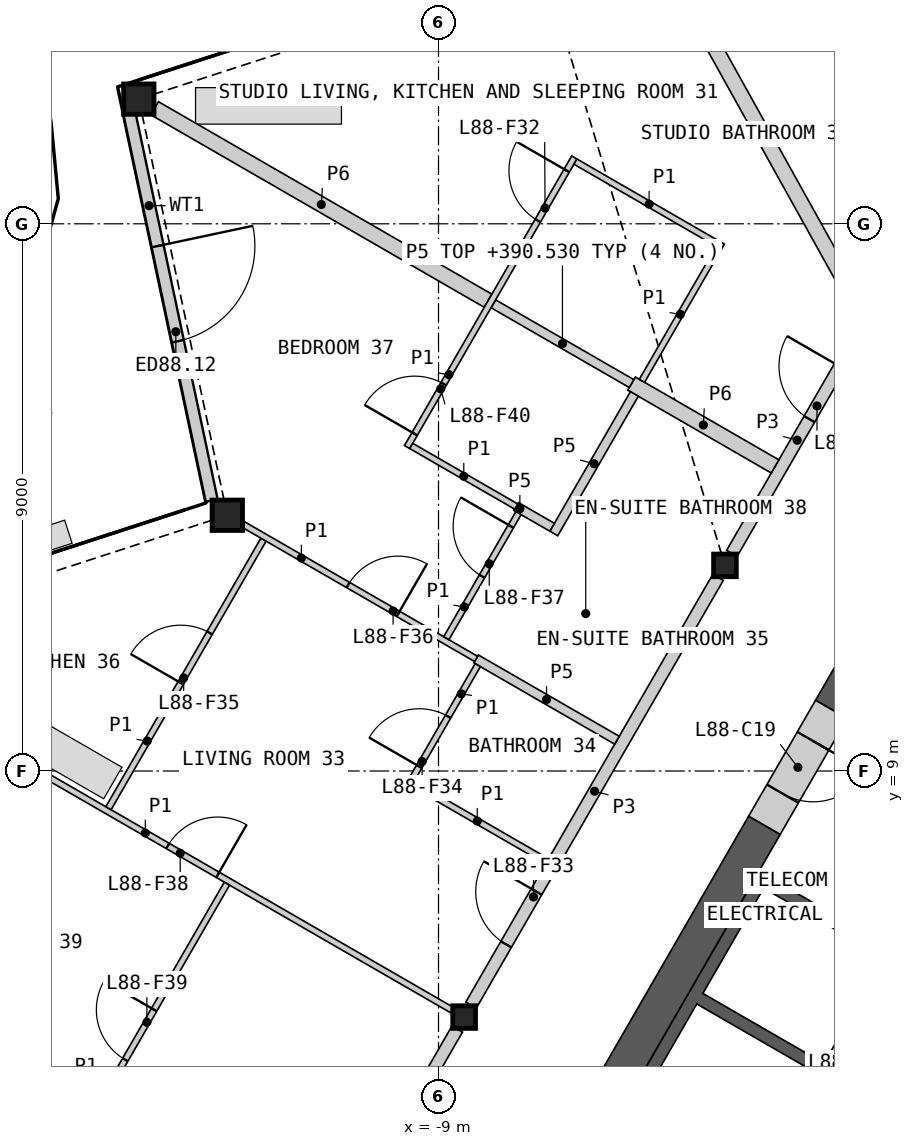
"""IFC4 building model, lengths in metres.
Left out: names, types, materials, properties, quantities, classifications, styles, units other than length and angle.
Written with IfcOpenShell. Run it as: python <this file> out.ifc"""

import sys

from ifc_helpers import new_model, si_unit, direction, frame, frame_2d, origin, origin_2d, place, context, subcontext, project, spatial, polyline, rectangle, hollow_rectangle, i_section, outline, extrude, element, fill, save


model = new_model("IFC4")
c1 = context("Model", 3, precision=1e-05, world=origin(), true_north=direction((0.0, 1.0)))
c2 = subcontext(c1, "Body", "Model", "MODEL_VIEW")
j1 = project(units=[si_unit("LENGTHUNIT", "METRE"), si_unit("PLANEANGLEUNIT", "RADIAN")], contexts=[c1])
p1 = place(None, origin())
s1 = spatial("IfcSite", under=j1, at=p1, CompositionType="ELEMENT")
p2 = place(p1, origin())
s2 = spatial("IfcBuilding", under=s1, at=p2, CompositionType="ELEMENT")
p3 = place(p2, frame((0.0, 0.0, 388.2)))
s3 = spatial("IfcBuildingStorey", under=s2, at=p3, CompositionType="ELEMENT", Elevation=388.2)
for number, where, z_axis, x_axis in (
    (1, (-13.929, 20.051, 0.0), (0.0, 0.0, 1.0), (1.0, 0.0, 0.0)),
    (2, (-12.474, 13.206, 0.0), (0.0, 0.0, 1.0), (1.0, 0.0, 0.0)),
):
    element("IfcColumn", number, at=place(p3, frame(where, z_axis=z_axis, x_axis=x_axis)), inside=s3, PredefinedType="COLUMN", context=c2, shape_type="SweptSolid", body=[
        extrude(hollow_rectangle(XDim=0.5, YDim=0.5, WallThickness=0.03, at=origin_2d()), origin(), (0.0, 0.0, 1.0), 3.4),
    ])
for number, where, z_axis, x_axis in (
    (3, (-4.289, 12.382, 0.0), (0.0, 0.0, 1.0), (1.0, 0.0, 0.0)),
    (4, (-8.578, 4.953, 0.0), (0.0, 0.0, 1.0), (1.0, 0.0, 0.0)),
):
    element("IfcColumn", number, at=place(p3, frame(where, z_axis=z_axis, x_axis=x_axis)), inside=s3, PredefinedType="COLUMN", context=c2, shape_type="SweptSolid", body=[
        extrude(i_section(OverallWidth=0.374, OverallDepth=0.372, WebThickness=0.016, FlangeThickness=0.026, at=origin_2d()), origin(), (0.0, 0.0, 1.0), 3.4),
    ])
p4 = place(p3, frame((-14.104, 19.915, 0.0), z_axis=(0.0, 0.0, 1.0), x_axis=(0.207924998532, -0.978144771997, 0.0)))
e5 = element("IfcWall", 5, at=p4, inside=s3, PredefinedType="SOLIDWALL", context=c2, shape_type="SweptSolid", body=[
    extrude(rectangle(XDim=6.612, YDim=0.2, at=frame_2d((3.306, 0.0))), origin(), (0.0, 0.0, 1.0), 2.634),
])
p5 = place(p4, frame((2.333, 0.0, 0.0)))
e6 = element("IfcOpeningElement", 6, at=p5, cuts=e5, PredefinedType="OPENING", context=c2, shape_type="SweptSolid", body=[
    extrude(rectangle(XDim=1.6, YDim=2.25, at=frame_2d((0.8, 1.125))), frame((0.0, 0.11, 0.0), z_axis=(0.0, -1.0, 0.0), x_axis=(1.0, 0.0, 0.0)), (0.0, 0.0, 1.0), 0.22),
])
p6 = place(p3, origin())
e7 = element("IfcWall", 7, at=p6, inside=s3, PredefinedType="SHEAR", context=c2, shape_type="SweptSolid", body=[
    extrude(outline(polyline([(-4.96, 0.208), (-7.131, 1.461), (-3.731, 7.35), (-1.561, 6.097), (-1.66, 5.924), (-3.652, 7.074), (-4.652, 5.342), (-2.66, 4.192), (-2.76, 4.019), (-4.752, 5.169), (-6.852, 1.531), (-4.861, 0.381), (-4.96, 0.208)])), origin(), (0.0, 0.0, 1.0), 3.1),
])
p7 = place(p3, frame((-1.631, 5.776, 0.0), z_axis=(0.0, 0.0, 1.0), x_axis=(-0.499992876559, -0.866029516466, 0.0)))
e8 = element("IfcWall", 8, at=p7, inside=s3, PredefinedType="SOLIDWALL", context=c2, shape_type="SweptSolid", body=[
    extrude(rectangle(XDim=6.486, YDim=0.2, at=frame_2d((3.243, 0.0))), origin(), (0.0, 0.0, 1.0), 3.1),
])
p8 = place(p7, frame((0.437, 0.0, 0.0)))
e9 = element("IfcOpeningElement", 9, at=p8, cuts=e8, PredefinedType="OPENING", context=c2, shape_type="SweptSolid", body=[
    extrude(rectangle(XDim=0.9, YDim=2.1, at=frame_2d((0.45, 1.05))), frame((0.0, 0.11, 0.0), z_axis=(0.0, -1.0, 0.0), x_axis=(1.0, 0.0, 0.0)), (0.0, 0.0, 1.0), 0.22),
])
p9 = place(p7, frame((3.737, 0.0, 0.0)))
e10 = element("IfcOpeningElement", 10, at=p9, cuts=e8, PredefinedType="OPENING", context=c2, shape_type="SweptSolid", body=[
    extrude(rectangle(XDim=0.9, YDim=2.1, at=frame_2d((0.45, 1.05))), frame((0.0, 0.11, 0.0), z_axis=(0.0, -1.0, 0.0), x_axis=(1.0, 0.0, 0.0)), (0.0, 0.0, 1.0), 0.22),
])
p10 = place(p3, frame((-3.639, 8.107, 0.0), z_axis=(0.0, 0.0, 1.0), x_axis=(-0.49999180351, -0.866030135978, 0.0)))
e11 = element("IfcWall", 11, at=p10, inside=s3, PredefinedType="SHEAR", context=c2, shape_type="SweptSolid", body=[
    extrude(rectangle(XDim=7.401, YDim=0.6, at=frame_2d((3.701, 0.0))), origin(), (0.0, 0.0, 1.0), 3.1),
])
p11 = place(p3, frame((-0.26, 13.961, 0.0), z_axis=(0.0, 0.0, 1.0), x_axis=(-0.499980485389, -0.866036670257, 0.0)))
e12 = element("IfcWall", 12, at=p11, inside=s3, PredefinedType="SHEAR", context=c2, shape_type="SweptSolid", body=[
    extrude(rectangle(XDim=4.559, YDim=0.6, at=frame_2d((2.28, 0.0))), origin(), (0.0, 0.0, 1.0), 3.1),
])
p12 = place(p3, frame((-2.539, 10.013, 0.0), z_axis=(0.0, 0.0, 1.0), x_axis=(-0.50002983664, -0.866008176907, 0.0)))
e13 = element("IfcWall", 13, at=p12, inside=s3, PredefinedType="SHEAR", context=c2, shape_type="SweptSolid", body=[
    extrude(rectangle(XDim=2.2, YDim=0.6, at=frame_2d((1.1, 0.0))), origin(), (0.0, 0.0, 1.0), 3.1),
])
p13 = place(p12, frame((0.6, 0.0, 0.0)))
e14 = element("IfcOpeningElement", 14, at=p13, cuts=e13, PredefinedType="OPENING", context=c2, shape_type="SweptSolid", body=[
    extrude(rectangle(XDim=1.0, YDim=2.1, at=frame_2d((0.5, 1.05))), frame((0.0, 0.31, 0.0), z_axis=(0.0, -1.0, 0.0), x_axis=(1.0, 0.0, 0.0)), (0.0, 0.0, 1.0), 0.62),
])
p14 = place(p3, frame((-8.685, 28.499, 0.0), z_axis=(0.0, 0.0, 1.0), x_axis=(0.486017177904, -0.873949256412, 0.0)))
e15 = element("IfcWall", 15, at=p14, inside=s3, PredefinedType="PARTITIONING", context=c2, shape_type="SweptSolid", body=[
    extrude(rectangle(XDim=13.956, YDim=0.25, at=frame_2d((6.978, 0.0))), origin(), (0.0, 0.0, 1.0), 2.33),
])
p15 = place(p3, frame((-8.465, 5.15, 0.0), z_axis=(0.0, 0.0, 1.0), x_axis=(0.499992155518, 0.866029932751, 0.0)))
e16 = element("IfcWall", 16, at=p15, inside=s3, PredefinedType="PARTITIONING", context=c2, shape_type="SweptSolid", body=[
    extrude(rectangle(XDim=8.123, YDim=0.2, at=frame_2d((4.062, 0.0))), origin(), (0.0, 0.0, 1.0), 3.1),
])
p16 = place(p15, frame((1.153, 0.0, 0.0)))
e17 = element("IfcOpeningElement", 17, at=p16, cuts=e16, PredefinedType="OPENING", context=c2, shape_type="SweptSolid", body=[
    extrude(rectangle(XDim=1.0, YDim=2.1, at=frame_2d((0.5, 1.05))), frame((0.0, 0.11, 0.0), z_axis=(0.0, -1.0, 0.0), x_axis=(1.0, 0.0, 0.0)), (0.0, 0.0, 1.0), 0.22),
])
p17 = place(p3, frame((-12.754, -2.279, 0.0), z_axis=(0.0, 0.0, 1.0), x_axis=(0.500001682468, 0.866024432409, 0.0)))
e18 = element("IfcWall", 18, at=p17, inside=s3, PredefinedType="PARTITIONING", context=c2, shape_type="SweptSolid", body=[
    extrude(rectangle(XDim=8.124, YDim=0.2, at=frame_2d((4.062, 0.0))), origin(), (0.0, 0.0, 1.0), 3.1),
])
p18 = place(p17, frame((1.153, 0.0, 0.0)))
e19 = element("IfcOpeningElement", 19, at=p18, cuts=e18, PredefinedType="OPENING", context=c2, shape_type="SweptSolid", body=[
    extrude(rectangle(XDim=1.0, YDim=2.1, at=frame_2d((0.5, 1.05))), frame((0.0, 0.11, 0.0), z_axis=(0.0, -1.0, 0.0), x_axis=(1.0, 0.0, 0.0)), (0.0, 0.0, 1.0), 0.22),
])
p19 = place(p3, frame((-17.414, 4.049, 0.0), z_axis=(0.0, 0.0, 1.0), x_axis=(0.866033839264, -0.499985389037, 0.0)))
e20 = element("IfcWall", 20, at=p19, inside=s3, PredefinedType="PARTITIONING", context=c2, shape_type="SweptSolid", body=[
    extrude(rectangle(XDim=7.1, YDim=0.25, at=frame_2d((3.55, 0.0))), origin(), (0.0, 0.0, 1.0), 2.33),
])
p20 = place(p3, frame((-13.669, 19.9, 0.0), z_axis=(0.0, 0.0, 1.0), x_axis=(0.866032778651, -0.499987226139, 0.0)))
e21 = element("IfcWall", 21, at=p20, inside=s3, PredefinedType="PARTITIONING", context=c2, shape_type="SweptSolid", body=[
    extrude(rectangle(XDim=6.332, YDim=0.25, at=frame_2d((3.166, 0.0))), origin(), (0.0, 0.0, 1.0), 2.33),
])
p21 = place(p3, frame((-4.176, 12.579, 0.0), z_axis=(0.0, 0.0, 1.0), x_axis=(0.500004215162, 0.866022970146, 0.0)))
e22 = element("IfcWall", 22, at=p21, inside=s3, PredefinedType="PARTITIONING", context=c2, shape_type="SweptSolid", body=[
    extrude(rectangle(XDim=4.3, YDim=0.2, at=frame_2d((2.15, 0.0))), origin(), (0.0, 0.0, 1.0), 3.1),
])
p22 = place(p21, frame((2.55, 0.0, 0.0)))
e23 = element("IfcOpeningElement", 23, at=p22, cuts=e22, PredefinedType="OPENING", context=c2, shape_type="SweptSolid", body=[
    extrude(rectangle(XDim=1.0, YDim=2.1, at=frame_2d((0.5, 1.05))), frame((0.0, 0.11, 0.0), z_axis=(0.0, -1.0, 0.0), x_axis=(1.0, 0.0, 0.0)), (0.0, 0.0, 1.0), 0.22),
])
p23 = place(p3, frame((-5.825, 15.372, 0.0), z_axis=(0.0, 0.0, 1.0), x_axis=(0.866051307416, -0.49995513091, 0.0)))
e24 = element("IfcWall", 24, at=p23, inside=s3, PredefinedType="PARTITIONING", context=c2, shape_type="SweptSolid", body=[
    extrude(rectangle(XDim=2.725, YDim=0.25, at=frame_2d((1.362, 0.0))), origin(), (0.0, 0.0, 1.0), 2.33),
])
p24 = place(p3, frame((-8.098, 16.684, 0.0), z_axis=(0.0, 0.0, 1.0), x_axis=(0.866036909293, -0.499980071345, 0.0)))
e25 = element("IfcWall", 25, at=p24, inside=s3, PredefinedType="PLUMBINGWALL", context=c2, shape_type="SweptSolid", body=[
    extrude(rectangle(XDim=2.625, YDim=0.15, at=frame_2d((1.312, 0.0))), origin(), (0.0, 0.0, 1.0), 2.33),
])
p25 = place(p3, frame((-8.382, 10.844, 0.0), z_axis=(0.0, 0.0, 1.0), x_axis=(0.866021425885, -0.500006889861, 0.0)))
e26 = element("IfcWall", 26, at=p25, inside=s3, PredefinedType="PLUMBINGWALL", context=c2, shape_type="SweptSolid", body=[
    extrude(rectangle(XDim=2.675, YDim=0.15, at=frame_2d((1.337, 0.0))), origin(), (0.0, 0.0, 1.0), 2.33),
])
p26 = place(p3, frame((-7.104, 12.906, 0.0), z_axis=(0.0, 0.0, 1.0), x_axis=(0.499993606316, 0.866029095148, 0.0)))
e27 = element("IfcWall", 27, at=p26, inside=s3, PredefinedType="PLUMBINGWALL", context=c2, shape_type="SweptSolid", body=[
    extrude(rectangle(XDim=2.65, YDim=0.15, at=frame_2d((1.325, 0.0))), origin(), (0.0, 0.0, 1.0), 2.33),
])
p27 = place(p3, frame((-7.72, 13.349, 0.0), z_axis=(0.0, 0.0, 1.0), x_axis=(0.866113839764, -0.499846793097, 0.0)))
e28 = element("IfcWall", 28, at=p27, inside=s3, PredefinedType="PLUMBINGWALL", context=c2, shape_type="SweptSolid", body=[
    extrude(rectangle(XDim=0.68, YDim=0.15, at=frame_2d((0.34, 0.0))), origin(), (0.0, 0.0, 1.0), 2.33),
])
p28 = place(p3, frame((-18.869, 10.894, 0.0), z_axis=(0.0, 0.0, 1.0), x_axis=(0.866023724155, -0.500002909193, 0.0)))
e29 = element("IfcWall", 29, at=p28, inside=s3, PredefinedType="PARTITIONING", context=c2, shape_type="SweptSolid", body=[
    extrude(rectangle(XDim=11.655, YDim=0.1, at=frame_2d((5.827, 0.0))), origin(), (0.0, 0.0, 1.0), 2.33),
])
p29 = place(p28, frame((6.253, 0.0, 0.0)))
e30 = element("IfcOpeningElement", 30, at=p29, cuts=e29, PredefinedType="OPENING", context=c2, shape_type="SweptSolid", body=[
    extrude(rectangle(XDim=0.95, YDim=2.1, at=frame_2d((0.475, 1.05))), frame((0.0, 0.06, 0.0), z_axis=(0.0, -1.0, 0.0), x_axis=(1.0, 0.0, 0.0)), (0.0, 0.0, 1.0), 0.12),
])
p30 = place(p3, frame((-9.517, 14.328, 0.0), z_axis=(0.0, 0.0, 1.0), x_axis=(0.499996545922, 0.866027397988, 0.0)))
e31 = element("IfcWall", 31, at=p30, inside=s3, PredefinedType="PARTITIONING", context=c2, shape_type="SweptSolid", body=[
    extrude(rectangle(XDim=5.5, YDim=0.1, at=frame_2d((2.75, 0.0))), origin(), (0.0, 0.0, 1.0), 2.33),
])
p31 = place(p30, frame((4.3, 0.0, 0.0)))
e32 = element("IfcOpeningElement", 32, at=p31, cuts=e31, PredefinedType="OPENING", context=c2, shape_type="SweptSolid", body=[
    extrude(rectangle(XDim=0.95, YDim=2.1, at=frame_2d((0.475, 1.05))), frame((0.0, 0.06, 0.0), z_axis=(0.0, -1.0, 0.0), x_axis=(1.0, 0.0, 0.0)), (0.0, 0.0, 1.0), 0.12),
])
p32 = place(p30, frame((0.25, 0.0, 0.0)))
e33 = element("IfcOpeningElement", 33, at=p32, cuts=e31, PredefinedType="OPENING", context=c2, shape_type="SweptSolid", body=[
    extrude(rectangle(XDim=0.95, YDim=2.1, at=frame_2d((0.475, 1.05))), frame((0.0, 0.06, 0.0), z_axis=(0.0, -1.0, 0.0), x_axis=(1.0, 0.0, 0.0)), (0.0, 0.0, 1.0), 0.12),
])
p33 = place(p3, frame((-14.992, 2.796, 0.0), z_axis=(0.0, 0.0, 1.0), x_axis=(0.499990214365, 0.86603105345, 0.0)))
e34 = element("IfcWall", 34, at=p33, inside=s3, PredefinedType="PARTITIONING", context=c2, shape_type="SweptSolid", body=[
    extrude(rectangle(XDim=5.025, YDim=0.1, at=frame_2d((2.512, 0.0))), origin(), (0.0, 0.0, 1.0), 2.33),
])
p34 = place(p33, frame((1.68, 0.0, 0.0)))
e35 = element("IfcOpeningElement", 35, at=p34, cuts=e34, PredefinedType="OPENING", context=c2, shape_type="SweptSolid", body=[
    extrude(rectangle(XDim=0.95, YDim=2.1, at=frame_2d((0.475, 1.05))), frame((0.0, 0.06, 0.0), z_axis=(0.0, -1.0, 0.0), x_axis=(1.0, 0.0, 0.0)), (0.0, 0.0, 1.0), 0.12),
])
p35 = place(p3, frame((-14.428, 8.388, 0.0), z_axis=(0.0, 0.0, 1.0), x_axis=(0.500005610874, 0.86602216432, 0.0)))
e36 = element("IfcWall", 36, at=p35, inside=s3, PredefinedType="PARTITIONING", context=c2, shape_type="SweptSolid", body=[
    extrude(rectangle(XDim=5.1, YDim=0.1, at=frame_2d((2.55, 0.0))), origin(), (0.0, 0.0, 1.0), 2.33),
])
p36 = place(p35, frame((2.379, 0.0, 0.0)))
e37 = element("IfcOpeningElement", 37, at=p36, cuts=e36, PredefinedType="OPENING", context=c2, shape_type="SweptSolid", body=[
    extrude(rectangle(XDim=0.95, YDim=2.1, at=frame_2d((0.475, 1.05))), frame((0.0, 0.06, 0.0), z_axis=(0.0, -1.0, 0.0), x_axis=(1.0, 0.0, 0.0)), (0.0, 0.0, 1.0), 0.12),
])
p37 = place(p3, frame((-12.214, 13.056, 0.0), z_axis=(0.0, 0.0, 1.0), x_axis=(0.866017452598, -0.500013771606, 0.0)))
e38 = element("IfcWall", 38, at=p37, inside=s3, PredefinedType="PARTITIONING", context=c2, shape_type="SweptSolid", body=[
    extrude(rectangle(XDim=4.425, YDim=0.1, at=frame_2d((2.213, 0.0))), origin(), (0.0, 0.0, 1.0), 2.33),
])
p38 = place(p37, frame((1.994, 0.0, 0.0)))
e39 = element("IfcOpeningElement", 39, at=p38, cuts=e38, PredefinedType="OPENING", context=c2, shape_type="SweptSolid", body=[
    extrude(rectangle(XDim=0.95, YDim=2.1, at=frame_2d((0.475, 1.05))), frame((0.0, 0.06, 0.0), z_axis=(0.0, -1.0, 0.0), x_axis=(1.0, 0.0, 0.0)), (0.0, 0.0, 1.0), 0.12),
])
p39 = place(p3, frame((-6.748, 19.023, 0.0), z_axis=(0.0, 0.0, 1.0), x_axis=(0.866034573852, -0.49998411664, 0.0)))
e40 = element("IfcWall", 40, at=p39, inside=s3, PredefinedType="PARTITIONING", context=c2, shape_type="SweptSolid", body=[
    extrude(rectangle(XDim=2.8, YDim=0.1, at=frame_2d((1.4, 0.0))), origin(), (0.0, 0.0, 1.0), 2.33),
])
p40 = place(p3, frame((-5.654, 15.418, 0.0), z_axis=(0.0, 0.0, 1.0), x_axis=(0.500048846702, 0.865997200291, 0.0)))
e41 = element("IfcWall", 41, at=p40, inside=s3, PredefinedType="PARTITIONING", context=c2, shape_type="SweptSolid", body=[
    extrude(rectangle(XDim=2.525, YDim=0.1, at=frame_2d((1.263, 0.0))), origin(), (0.0, 0.0, 1.0), 2.33),
])
p41 = place(p3, frame((-9.51, 8.839, 0.0), z_axis=(0.0, 0.0, 1.0), x_axis=(0.866029095148, -0.499993606316, 0.0)))
e42 = element("IfcWall", 42, at=p41, inside=s3, PredefinedType="PARTITIONING", context=c2, shape_type="SweptSolid", body=[
    extrude(rectangle(XDim=2.65, YDim=0.1, at=frame_2d((1.325, 0.0))), origin(), (0.0, 0.0, 1.0), 2.33),
])
p42 = place(p3, frame((-8.872, 11.184, 0.0), z_axis=(0.0, 0.0, 1.0), x_axis=(0.499986429846, 0.866033238375, 0.0)))
e43 = element("IfcWall", 43, at=p42, inside=s3, PredefinedType="PARTITIONING", context=c2, shape_type="SweptSolid", body=[
    extrude(rectangle(XDim=2.375, YDim=0.1, at=frame_2d((1.188, 0.0))), origin(), (0.0, 0.0, 1.0), 2.33),
])
p43 = place(p42, frame((1.175, 0.0, 0.0)))
e44 = element("IfcOpeningElement", 44, at=p43, cuts=e43, PredefinedType="OPENING", context=c2, shape_type="SweptSolid", body=[
    extrude(rectangle(XDim=0.95, YDim=2.1, at=frame_2d((0.475, 1.05))), frame((0.0, 0.06, 0.0), z_axis=(0.0, -1.0, 0.0), x_axis=(1.0, 0.0, 0.0)), (0.0, 0.0, 1.0), 0.12),
])
p44 = place(p3, frame((-9.442, 8.858, 0.0), z_axis=(0.0, 0.0, 1.0), x_axis=(0.499978335414, 0.866037911478, 0.0)))
e45 = element("IfcWall", 45, at=p44, inside=s3, PredefinedType="PARTITIONING", context=c2, shape_type="SweptSolid", body=[
    extrude(rectangle(XDim=2.175, YDim=0.1, at=frame_2d((1.087, 0.0))), origin(), (0.0, 0.0, 1.0), 2.33),
])
p45 = place(p44, frame((0.25, 0.0, 0.0)))
e46 = element("IfcOpeningElement", 46, at=p45, cuts=e45, PredefinedType="OPENING", context=c2, shape_type="SweptSolid", body=[
    extrude(rectangle(XDim=0.95, YDim=2.1, at=frame_2d((0.475, 1.05))), frame((0.0, 0.06, 0.0), z_axis=(0.0, -1.0, 0.0), x_axis=(1.0, 0.0, 0.0)), (0.0, 0.0, 1.0), 0.12),
])
p46 = place(p3, frame((-9.448, 14.346, 0.0), z_axis=(0.0, 0.0, 1.0), x_axis=(0.866020521143, -0.500008456887, 0.0)))
e47 = element("IfcWall", 47, at=p46, inside=s3, PredefinedType="PARTITIONING", context=c2, shape_type="SweptSolid", body=[
    extrude(rectangle(XDim=1.995, YDim=0.1, at=frame_2d((0.998, 0.0))), origin(), (0.0, 0.0, 1.0), 2.33),
])
p47 = place(p5, origin())
e48 = element("IfcDoor", 48, at=p47, inside=s3, OperationType="DOUBLE_DOOR_SINGLE_SWING", PredefinedType="DOOR", context=c2, shape_type="SweptSolid", body=[
    extrude(rectangle(XDim=1.6, YDim=2.25, at=frame_2d((0.8, 1.125))), frame((0.0, 0.025, 0.0), z_axis=(0.0, -1.0, 0.0), x_axis=(1.0, 0.0, 0.0)), (0.0, 0.0, 1.0), 0.05),
])
fill(e6, e48)
p48 = place(p13, origin())
e49 = element("IfcDoor", 49, at=p48, inside=s3, OperationType="SINGLE_SWING_LEFT", PredefinedType="DOOR", context=c2, shape_type="SweptSolid", body=[
    extrude(rectangle(XDim=1.0, YDim=2.1, at=frame_2d((0.5, 1.05))), frame((0.0, 0.055, 0.0), z_axis=(0.0, -1.0, 0.0), x_axis=(1.0, 0.0, 0.0)), (0.0, 0.0, 1.0), 0.05),
])
fill(e14, e49)
p49 = place(p22, origin())
e50 = element("IfcDoor", 50, at=p49, inside=s3, OperationType="SINGLE_SWING_RIGHT", PredefinedType="DOOR", context=c2, shape_type="SweptSolid", body=[
    extrude(rectangle(XDim=1.0, YDim=2.1, at=frame_2d((0.5, 1.05))), frame((0.0, 0.025, 0.0), z_axis=(0.0, -1.0, 0.0), x_axis=(1.0, 0.0, 0.0)), (0.0, 0.0, 1.0), 0.05),
])
fill(e23, e50)
p50 = place(p31, origin())
e51 = element("IfcDoor", 51, at=p50, inside=s3, OperationType="SINGLE_SWING_RIGHT", PredefinedType="DOOR", context=c2, shape_type="SweptSolid", body=[
    extrude(rectangle(XDim=0.95, YDim=2.1, at=frame_2d((0.475, 1.05))), frame((0.0, 0.025, 0.0), z_axis=(0.0, -1.0, 0.0), x_axis=(1.0, 0.0, 0.0)), (0.0, 0.0, 1.0), 0.05),
])
fill(e32, e51)
p51 = place(p16, origin())
e52 = element("IfcDoor", 52, at=p51, inside=s3, OperationType="SINGLE_SWING_RIGHT", PredefinedType="DOOR", context=c2, shape_type="SweptSolid", body=[
    extrude(rectangle(XDim=1.0, YDim=2.1, at=frame_2d((0.5, 1.05))), frame((0.0, 0.025, 0.0), z_axis=(0.0, -1.0, 0.0), x_axis=(1.0, 0.0, 0.0)), (0.0, 0.0, 1.0), 0.05),
])
fill(e17, e52)
p52 = place(p45, origin())
e53 = element("IfcDoor", 53, at=p52, inside=s3, OperationType="SINGLE_SWING_LEFT", PredefinedType="DOOR", context=c2, shape_type="SweptSolid", body=[
    extrude(rectangle(XDim=0.95, YDim=2.1, at=frame_2d((0.475, 1.05))), frame((0.0, 0.025, 0.0), z_axis=(0.0, -1.0, 0.0), x_axis=(1.0, 0.0, 0.0)), (0.0, 0.0, 1.0), 0.05),
])
fill(e46, e53)
p53 = place(p36, origin())
e54 = element("IfcDoor", 54, at=p53, inside=s3, OperationType="SINGLE_SWING_LEFT", PredefinedType="DOOR", context=c2, shape_type="SweptSolid", body=[
    extrude(rectangle(XDim=0.95, YDim=2.1, at=frame_2d((0.475, 1.05))), frame((0.0, 0.025, 0.0), z_axis=(0.0, -1.0, 0.0), x_axis=(1.0, 0.0, 0.0)), (0.0, 0.0, 1.0), 0.05),
])
fill(e37, e54)
p54 = place(p38, origin())
e55 = element("IfcDoor", 55, at=p54, inside=s3, OperationType="SINGLE_SWING_RIGHT", PredefinedType="DOOR", context=c2, shape_type="SweptSolid", body=[
    extrude(rectangle(XDim=0.95, YDim=2.1, at=frame_2d((0.475, 1.05))), frame((0.0, 0.025, 0.0), z_axis=(0.0, -1.0, 0.0), x_axis=(1.0, 0.0, 0.0)), (0.0, 0.0, 1.0), 0.05),
])
fill(e39, e55)
p55 = place(p43, origin())
e56 = element("IfcDoor", 56, at=p55, inside=s3, OperationType="SINGLE_SWING_RIGHT", PredefinedType="DOOR", context=c2, shape_type="SweptSolid", body=[
    extrude(rectangle(XDim=0.95, YDim=2.1, at=frame_2d((0.475, 1.05))), frame((0.0, 0.025, 0.0), z_axis=(0.0, -1.0, 0.0), x_axis=(1.0, 0.0, 0.0)), (0.0, 0.0, 1.0), 0.05),
])
fill(e44, e56)
p56 = place(p29, origin())
e57 = element("IfcDoor", 57, at=p56, inside=s3, OperationType="SINGLE_SWING_RIGHT", PredefinedType="DOOR", context=c2, shape_type="SweptSolid", body=[
    extrude(rectangle(XDim=0.95, YDim=2.1, at=frame_2d((0.475, 1.05))), frame((0.0, 0.025, 0.0), z_axis=(0.0, -1.0, 0.0), x_axis=(1.0, 0.0, 0.0)), (0.0, 0.0, 1.0), 0.05),
])
fill(e30, e57)
p57 = place(p34, origin())
e58 = element("IfcDoor", 58, at=p57, inside=s3, OperationType="SINGLE_SWING_RIGHT", PredefinedType="DOOR", context=c2, shape_type="SweptSolid", body=[
    extrude(rectangle(XDim=0.95, YDim=2.1, at=frame_2d((0.475, 1.05))), frame((0.0, 0.025, 0.0), z_axis=(0.0, -1.0, 0.0), x_axis=(1.0, 0.0, 0.0)), (0.0, 0.0, 1.0), 0.05),
])
fill(e35, e58)
p58 = place(p32, origin())
e59 = element("IfcDoor", 59, at=p58, inside=s3, OperationType="SINGLE_SWING_LEFT", PredefinedType="DOOR", context=c2, shape_type="SweptSolid", body=[
    extrude(rectangle(XDim=0.95, YDim=2.1, at=frame_2d((0.475, 1.05))), frame((0.0, 0.025, 0.0), z_axis=(0.0, -1.0, 0.0), x_axis=(1.0, 0.0, 0.0)), (0.0, 0.0, 1.0), 0.05),
])
fill(e33, e59)
save(model, sys.argv[1])
